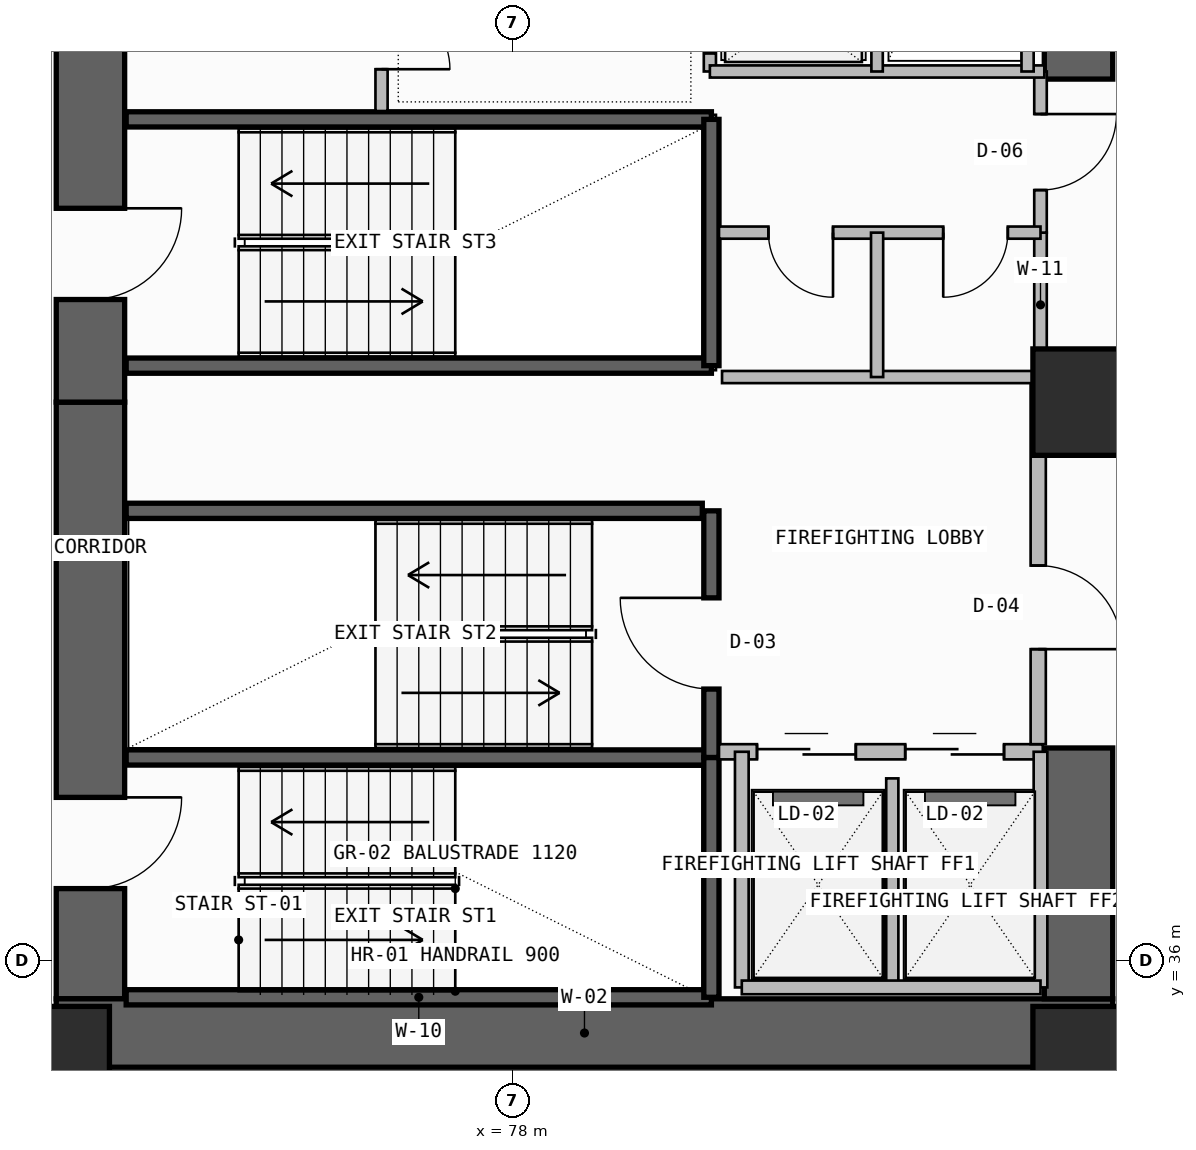
"""IFC4 building model, lengths in metres.
Left out: names, types, materials, properties, quantities, classifications, styles, units other than length and angle.
Written with IfcOpenShell. Run it as: python <this file> out.ifc"""

import sys

from ifc_helpers import new_model, si_unit, direction, frame, frame_2d, origin, origin_2d, place, context, subcontext, project, spatial, rectangle, extrude, element, fill, save


model = new_model("IFC4")
c1 = context("Model", 3, precision=1e-05, world=origin(), true_north=direction((0.0, 1.0)))
c2 = subcontext(c1, "Body", "Model", "MODEL_VIEW")
j1 = project(units=[si_unit("LENGTHUNIT", "METRE"), si_unit("PLANEANGLEUNIT", "RADIAN")], contexts=[c1])
p1 = place(None, origin())
s1 = spatial("IfcSite", under=j1, at=p1, CompositionType="ELEMENT")
p2 = place(p1, origin())
s2 = spatial("IfcBuilding", under=s1, at=p2, CompositionType="ELEMENT")
p3 = place(p2, frame((0.0, 0.0, 99.3)))
s3 = spatial("IfcBuildingStorey", under=s2, at=p3, CompositionType="ELEMENT", Elevation=99.3)
p4 = place(p3, frame((72.45, 35.5, -0.26), z_axis=(0.0, 0.0, 1.0), x_axis=(0.0, 1.0, 0.0)))
e1 = element("IfcWall", 1, at=p4, inside=s3, PredefinedType="SHEAR", context=c2, shape_type="SweptSolid", body=[
    extrude(rectangle(XDim=7.85, YDim=0.9, at=frame_2d((3.925, 0.0))), origin(), (0.0, 0.0, 1.0), 3.6),
])
p5 = place(p4, frame((1.45, 0.0, 0.26)))
e2 = element("IfcOpeningElement", 2, at=p5, cuts=e1, PredefinedType="OPENING", context=c2, shape_type="SweptSolid", body=[
    extrude(rectangle(XDim=1.2, YDim=2.2, at=frame_2d((0.6, 1.1))), frame((0.0, 0.46, 0.0), z_axis=(0.0, -1.0, 0.0), x_axis=(1.0, 0.0, 0.0)), (0.0, 0.0, 1.0), 0.92),
])
p6 = place(p3, frame((72.0, 35.05, -0.26), z_axis=(0.0, 0.0, 1.0), x_axis=(1.0, 0.0, 0.0)))
e3 = element("IfcWall", 3, at=p6, inside=s3, PredefinedType="SHEAR", context=c2, shape_type="SweptSolid", body=[
    extrude(rectangle(XDim=13.9, YDim=0.9, at=frame_2d((6.95, 0.0))), origin(), (0.0, 0.0, 1.0), 3.6),
])
p7 = place(p3, frame((85.45, 35.5, -0.26), z_axis=(0.0, 0.0, 1.0), x_axis=(0.0, 1.0, 0.0)))
e4 = element("IfcWall", 4, at=p7, inside=s3, PredefinedType="SHEAR", context=c2, shape_type="SweptSolid", body=[
    extrude(rectangle(XDim=3.3, YDim=0.9, at=frame_2d((1.65, 0.0))), origin(), (0.0, 0.0, 1.0), 3.6),
])
p8 = place(p3, frame((72.45, 43.35, -0.26), z_axis=(0.0, 0.0, 1.0), x_axis=(0.0, 1.0, 0.0)))
e5 = element("IfcWall", 5, at=p8, inside=s3, PredefinedType="SHEAR", context=c2, shape_type="SweptSolid", body=[
    extrude(rectangle(XDim=12.7, YDim=0.9, at=frame_2d((6.35, 0.0))), origin(), (0.0, 0.0, 1.0), 3.6),
])
p9 = place(p8, frame((1.35, 0.0, 0.26)))
e6 = element("IfcOpeningElement", 6, at=p9, cuts=e5, PredefinedType="OPENING", context=c2, shape_type="SweptSolid", body=[
    extrude(rectangle(XDim=1.2, YDim=2.2, at=frame_2d((0.6, 1.1))), frame((0.0, 0.46, 0.0), z_axis=(0.0, -1.0, 0.0), x_axis=(1.0, 0.0, 0.0)), (0.0, 0.0, 1.0), 0.92),
])
p10 = place(p3, frame((85.45, 47.6, -0.26), z_axis=(0.0, 0.0, 1.0), x_axis=(0.0, 1.0, 0.0)))
e7 = element("IfcWall", 7, at=p10, inside=s3, PredefinedType="SHEAR", context=c2, shape_type="SweptSolid", body=[
    extrude(rectangle(XDim=8.45, YDim=0.9, at=frame_2d((4.225, 0.0))), origin(), (0.0, 0.0, 1.0), 3.6),
])
for number, where, z_axis, x_axis in (
    (8, (72.0, 34.7, 0.0), (0.0, 0.0, 1.0), (1.0, 0.0, 0.0)),
    (9, (85.55, 34.7, 0.0), (0.0, 0.0, 1.0), (1.0, 0.0, 0.0)),
    (10, (85.55, 43.35, 0.0), (0.0, 0.0, 1.0), (1.0, 0.0, 0.0)),
):
    element("IfcColumn", number, at=place(p3, frame(where, z_axis=z_axis, x_axis=x_axis)), inside=s3, PredefinedType="COLUMN", context=c2, shape_type="SweptSolid", body=[
        extrude(rectangle(XDim=1.4, YDim=1.4, at=origin_2d()), origin(), (0.0, 0.0, 1.0), 3.6),
    ])
for number, where, z_axis, x_axis in (
    (11, (72.92, 35.52, -0.26), (0.0, 0.0, 1.0), (1.0, 0.0, 0.0)),
    (12, (72.92, 38.675, -0.26), (0.0, 0.0, 1.0), (1.0, 0.0, 0.0)),
):
    element("IfcWall", number, at=place(p3, frame(where, z_axis=z_axis, x_axis=x_axis)), inside=s3, PredefinedType="SOLIDWALL", context=c2, shape_type="SweptSolid", body=[
        extrude(rectangle(XDim=7.7, YDim=0.2, at=frame_2d((3.85, 0.0))), origin(), (0.0, 0.0, 1.0), 3.6),
    ])
p11 = place(p3, frame((80.62, 35.52, -0.26), z_axis=(0.0, 0.0, 1.0), x_axis=(0.0, 1.0, 0.0)))
e13 = element("IfcWall", 13, at=p11, inside=s3, PredefinedType="SOLIDWALL", context=c2, shape_type="SweptSolid", body=[
    extrude(rectangle(XDim=3.155, YDim=0.2, at=frame_2d((1.578, 0.0))), origin(), (0.0, 0.0, 1.0), 3.6),
])
p12 = place(p3, frame((80.62, 38.675, -0.26), z_axis=(0.0, 0.0, 1.0), x_axis=(0.0, 1.0, 0.0)))
e14 = element("IfcWall", 14, at=p12, inside=s3, PredefinedType="SOLIDWALL", context=c2, shape_type="SweptSolid", body=[
    extrude(rectangle(XDim=3.245, YDim=0.2, at=frame_2d((1.623, 0.0))), origin(), (0.0, 0.0, 1.0), 3.6),
])
p13 = place(p12, frame((0.9, 0.0, 0.26)))
e15 = element("IfcOpeningElement", 15, at=p13, cuts=e14, PredefinedType="OPENING", context=c2, shape_type="SweptSolid", body=[
    extrude(rectangle(XDim=1.2, YDim=2.2, at=frame_2d((0.6, 1.1))), frame((0.0, 0.11, 0.0), z_axis=(0.0, -1.0, 0.0), x_axis=(1.0, 0.0, 0.0)), (0.0, 0.0, 1.0), 0.22),
])
p14 = place(p3, frame((80.72, 38.75, 0.0), z_axis=(0.0, 0.0, 1.0), x_axis=(1.0, 0.0, 0.0)))
e16 = element("IfcWall", 16, at=p14, inside=s3, PredefinedType="SOLIDWALL", context=c2, shape_type="SweptSolid", body=[
    extrude(rectangle(XDim=4.26, YDim=0.2, at=frame_2d((2.13, 0.0))), origin(), (0.0, 0.0, 1.0), 3.34),
])
p15 = place(p14, frame((0.5, 0.0, 0.0)))
e17 = element("IfcOpeningElement", 17, at=p15, cuts=e16, PredefinedType="OPENING", context=c2, shape_type="SweptSolid", body=[
    extrude(rectangle(XDim=1.3, YDim=2.3, at=frame_2d((0.65, 1.15))), frame((0.0, 0.11, 0.0), z_axis=(0.0, -1.0, 0.0), x_axis=(1.0, 0.0, 0.0)), (0.0, 0.0, 1.0), 0.22),
])
p16 = place(p14, frame((2.45, 0.0, 0.0)))
e18 = element("IfcOpeningElement", 18, at=p16, cuts=e16, PredefinedType="OPENING", context=c2, shape_type="SweptSolid", body=[
    extrude(rectangle(XDim=1.3, YDim=2.3, at=frame_2d((0.65, 1.15))), frame((0.0, 0.11, 0.0), z_axis=(0.0, -1.0, 0.0), x_axis=(1.0, 0.0, 0.0)), (0.0, 0.0, 1.0), 0.22),
])
p17 = place(p3, frame((83.0, 35.65, 0.0), z_axis=(0.0, 0.0, 1.0), x_axis=(0.0, 1.0, 0.0)))
e19 = element("IfcWall", 19, at=p17, inside=s3, PredefinedType="PLUMBINGWALL", context=c2, shape_type="SweptSolid", body=[
    extrude(rectangle(XDim=2.75, YDim=0.16, at=frame_2d((1.375, 0.0))), origin(), (0.0, 0.0, 1.0), 3.34),
])
for number, where, z_axis, x_axis in (
    (20, (84.95, 35.65, 0.0), (0.0, 0.0, 1.0), (0.0, 1.0, 0.0)),
    (21, (81.02, 35.65, 0.0), (0.0, 0.0, 1.0), (0.0, 1.0, 0.0)),
):
    element("IfcWall", number, at=place(p3, frame(where, z_axis=z_axis, x_axis=x_axis)), inside=s3, PredefinedType="SOLIDWALL", context=c2, shape_type="SweptSolid", body=[
        extrude(rectangle(XDim=3.1, YDim=0.18, at=frame_2d((1.55, 0.0))), origin(), (0.0, 0.0, 1.0), 3.34),
    ])
p18 = place(p3, frame((81.02, 35.65, 0.0), z_axis=(0.0, 0.0, 1.0), x_axis=(1.0, 0.0, 0.0)))
e22 = element("IfcWall", 22, at=p18, inside=s3, PredefinedType="SOLIDWALL", context=c2, shape_type="SweptSolid", body=[
    extrude(rectangle(XDim=3.93, YDim=0.18, at=frame_2d((1.965, 0.0))), origin(), (0.0, 0.0, 1.0), 3.34),
])
p19 = place(p3, frame((84.92, 38.85, 0.0), z_axis=(0.0, 0.0, 1.0), x_axis=(0.0, 1.0, 0.0)))
e23 = element("IfcWall", 23, at=p19, inside=s3, PredefinedType="SOLIDWALL", context=c2, shape_type="SweptSolid", body=[
    extrude(rectangle(XDim=4.83, YDim=0.2, at=frame_2d((2.415, 0.0))), origin(), (0.0, 0.0, 1.0), 3.34),
])
p20 = place(p19, frame((1.25, 0.0, 0.0)))
e24 = element("IfcOpeningElement", 24, at=p20, cuts=e23, PredefinedType="OPENING", context=c2, shape_type="SweptSolid", body=[
    extrude(rectangle(XDim=1.1, YDim=2.2, at=frame_2d((0.55, 1.1))), frame((0.0, 0.11, 0.0), z_axis=(0.0, -1.0, 0.0), x_axis=(1.0, 0.0, 0.0)), (0.0, 0.0, 1.0), 0.22),
])
p21 = place(p3, frame((72.92, 41.92, -0.26), z_axis=(0.0, 0.0, 1.0), x_axis=(1.0, 0.0, 0.0)))
e25 = element("IfcWall", 25, at=p21, inside=s3, PredefinedType="SOLIDWALL", context=c2, shape_type="SweptSolid", body=[
    extrude(rectangle(XDim=7.58, YDim=0.2, at=frame_2d((3.79, 0.0))), origin(), (0.0, 0.0, 1.0), 3.6),
])
for number, where, z_axis, x_axis in (
    (26, (72.92, 43.83, -0.26), (0.0, 0.0, 1.0), (1.0, 0.0, 0.0)),
    (27, (72.92, 47.07, -0.26), (0.0, 0.0, 1.0), (1.0, 0.0, 0.0)),
):
    element("IfcWall", number, at=place(p3, frame(where, z_axis=z_axis, x_axis=x_axis)), inside=s3, PredefinedType="SOLIDWALL", context=c2, shape_type="SweptSolid", body=[
        extrude(rectangle(XDim=7.7, YDim=0.2, at=frame_2d((3.85, 0.0))), origin(), (0.0, 0.0, 1.0), 3.6),
    ])
p22 = place(p3, frame((80.62, 43.83, -0.26), z_axis=(0.0, 0.0, 1.0), x_axis=(0.0, 1.0, 0.0)))
e28 = element("IfcWall", 28, at=p22, inside=s3, PredefinedType="SOLIDWALL", context=c2, shape_type="SweptSolid", body=[
    extrude(rectangle(XDim=3.24, YDim=0.2, at=frame_2d((1.62, 0.0))), origin(), (0.0, 0.0, 1.0), 3.6),
])
p23 = place(p3, frame((84.95, 43.68, 0.0), z_axis=(0.0, 0.0, 1.0), x_axis=(0.0, 1.0, 0.0)))
e29 = element("IfcWall", 29, at=p23, inside=s3, PredefinedType="PLUMBINGWALL", context=c2, shape_type="SweptSolid", body=[
    extrude(rectangle(XDim=1.9, YDim=0.165, at=frame_2d((0.95, 0.0))), origin(), (0.0, 0.0, 1.0), 3.34),
])
p24 = place(p3, frame((84.95, 45.58, 0.0), z_axis=(0.0, 0.0, 1.0), x_axis=(0.0, 1.0, 0.0)))
e30 = element("IfcWall", 30, at=p24, inside=s3, PredefinedType="PARTITIONING", context=c2, shape_type="SweptSolid", body=[
    extrude(rectangle(XDim=2.12, YDim=0.165, at=frame_2d((1.06, 0.0))), origin(), (0.0, 0.0, 1.0), 3.34),
])
p25 = place(p24, frame((0.56, 0.0, 0.0)))
e31 = element("IfcOpeningElement", 31, at=p25, cuts=e30, PredefinedType="OPENING", context=c2, shape_type="SweptSolid", body=[
    extrude(rectangle(XDim=1.0, YDim=2.2, at=frame_2d((0.5, 1.1))), frame((0.0, 0.093, 0.0), z_axis=(0.0, -1.0, 0.0), x_axis=(1.0, 0.0, 0.0)), (0.0, 0.0, 1.0), 0.185),
])
p26 = place(p3, frame((80.72, 45.58, 0.0), z_axis=(0.0, 0.0, 1.0), x_axis=(1.0, 0.0, 0.0)))
e32 = element("IfcWall", 32, at=p26, inside=s3, PredefinedType="PLUMBINGWALL", context=c2, shape_type="SweptSolid", body=[
    extrude(rectangle(XDim=4.23, YDim=0.16, at=frame_2d((2.115, 0.0))), origin(), (0.0, 0.0, 1.0), 3.34),
])
p27 = place(p26, frame((0.65, 0.0, 0.0)))
e33 = element("IfcOpeningElement", 33, at=p27, cuts=e32, PredefinedType="OPENING", context=c2, shape_type="SweptSolid", body=[
    extrude(rectangle(XDim=0.85, YDim=2.05, at=frame_2d((0.425, 1.025))), frame((0.0, 0.09, 0.0), z_axis=(0.0, -1.0, 0.0), x_axis=(1.0, 0.0, 0.0)), (0.0, 0.0, 1.0), 0.18),
])
p28 = place(p26, frame((2.95, 0.0, 0.0)))
e34 = element("IfcOpeningElement", 34, at=p28, cuts=e32, PredefinedType="OPENING", context=c2, shape_type="SweptSolid", body=[
    extrude(rectangle(XDim=0.85, YDim=2.05, at=frame_2d((0.425, 1.025))), frame((0.0, 0.09, 0.0), z_axis=(0.0, -1.0, 0.0), x_axis=(1.0, 0.0, 0.0)), (0.0, 0.0, 1.0), 0.18),
])
p29 = place(p3, frame((80.76, 43.68, 0.0), z_axis=(0.0, 0.0, 1.0), x_axis=(1.0, 0.0, 0.0)))
e35 = element("IfcWall", 35, at=p29, inside=s3, PredefinedType="PLUMBINGWALL", context=c2, shape_type="SweptSolid", body=[
    extrude(rectangle(XDim=4.19, YDim=0.16, at=frame_2d((2.095, 0.0))), origin(), (0.0, 0.0, 1.0), 3.34),
])
p30 = place(p3, frame((82.8, 43.68, 0.0), z_axis=(0.0, 0.0, 1.0), x_axis=(0.0, 1.0, 0.0)))
e36 = element("IfcWall", 36, at=p30, inside=s3, PredefinedType="PLUMBINGWALL", context=c2, shape_type="SweptSolid", body=[
    extrude(rectangle(XDim=1.9, YDim=0.16, at=frame_2d((0.95, 0.0))), origin(), (0.0, 0.0, 1.0), 3.34),
])
p31 = place(p3, frame((76.28, 47.18, 0.0), z_axis=(0.0, 0.0, 1.0), x_axis=(0.0, 1.0, 0.0)))
e37 = element("IfcWall", 37, at=p31, inside=s3, PredefinedType="SOLIDWALL", context=c2, shape_type="SweptSolid", body=[
    extrude(rectangle(XDim=5.14, YDim=0.16, at=frame_2d((2.57, 0.0))), origin(), (0.0, 0.0, 1.0), 3.34),
])
p32 = place(p31, frame((0.55, 0.0, 0.0)))
e38 = element("IfcOpeningElement", 38, at=p32, cuts=e37, PredefinedType="OPENING", context=c2, shape_type="SweptSolid", body=[
    extrude(rectangle(XDim=0.9, YDim=2.1, at=frame_2d((0.45, 1.05))), frame((0.0, 0.09, 0.0), z_axis=(0.0, -1.0, 0.0), x_axis=(1.0, 0.0, 0.0)), (0.0, 0.0, 1.0), 0.18),
])
p33 = place(p31, frame((2.95, 0.0, 0.0)))
e39 = element("IfcOpeningElement", 39, at=p33, cuts=e37, PredefinedType="OPENING", context=c2, shape_type="SweptSolid", body=[
    extrude(rectangle(XDim=1.0, YDim=2.2, at=frame_2d((0.5, 1.1))), frame((0.0, 0.09, 0.0), z_axis=(0.0, -1.0, 0.0), x_axis=(1.0, 0.0, 0.0)), (0.0, 0.0, 1.0), 0.18),
])
p34 = place(p3, frame((80.6, 47.7, 0.0), z_axis=(0.0, 0.0, 1.0), x_axis=(0.0, 1.0, 0.0)))
e40 = element("IfcWall", 40, at=p34, inside=s3, PredefinedType="SOLIDWALL", context=c2, shape_type="SweptSolid", body=[
    extrude(rectangle(XDim=4.6, YDim=0.16, at=frame_2d((2.3, 0.0))), origin(), (0.0, 0.0, 1.0), 3.34),
])
p35 = place(p34, frame((0.24, 0.0, 0.0)))
e41 = element("IfcOpeningElement", 41, at=p35, cuts=e40, PredefinedType="OPENING", context=c2, shape_type="SweptSolid", body=[
    extrude(rectangle(XDim=1.1, YDim=2.25, at=frame_2d((0.55, 1.125))), frame((0.0, 0.09, 0.0), z_axis=(0.0, -1.0, 0.0), x_axis=(1.0, 0.0, 0.0)), (0.0, 0.0, 1.0), 0.18),
])
p36 = place(p34, frame((1.76, 0.0, 0.0)))
e42 = element("IfcOpeningElement", 42, at=p36, cuts=e40, PredefinedType="OPENING", context=c2, shape_type="SweptSolid", body=[
    extrude(rectangle(XDim=1.1, YDim=2.25, at=frame_2d((0.55, 1.125))), frame((0.0, 0.09, 0.0), z_axis=(0.0, -1.0, 0.0), x_axis=(1.0, 0.0, 0.0)), (0.0, 0.0, 1.0), 0.18),
])
p37 = place(p34, frame((3.28, 0.0, 0.0)))
e43 = element("IfcOpeningElement", 43, at=p37, cuts=e40, PredefinedType="OPENING", context=c2, shape_type="SweptSolid", body=[
    extrude(rectangle(XDim=1.1, YDim=2.25, at=frame_2d((0.55, 1.125))), frame((0.0, 0.09, 0.0), z_axis=(0.0, -1.0, 0.0), x_axis=(1.0, 0.0, 0.0)), (0.0, 0.0, 1.0), 0.18),
])
p38 = place(p3, frame((80.6, 47.7, 0.0), z_axis=(0.0, 0.0, 1.0), x_axis=(1.0, 0.0, 0.0)))
e44 = element("IfcWall", 44, at=p38, inside=s3, PredefinedType="SOLIDWALL", context=c2, shape_type="SweptSolid", body=[
    extrude(rectangle(XDim=4.4, YDim=0.16, at=frame_2d((2.2, 0.0))), origin(), (0.0, 0.0, 1.0), 3.34),
])
p39 = place(p3, frame((82.8, 47.7, 0.0), z_axis=(0.0, 0.0, 1.0), x_axis=(0.0, 1.0, 0.0)))
e45 = element("IfcWall", 45, at=p39, inside=s3, PredefinedType="PLUMBINGWALL", context=c2, shape_type="SweptSolid", body=[
    extrude(rectangle(XDim=4.6, YDim=0.15, at=frame_2d((2.3, 0.0))), origin(), (0.0, 0.0, 1.0), 3.34),
])
p40 = place(p3, frame((84.78, 47.7, 0.0), z_axis=(0.0, 0.0, 1.0), x_axis=(0.0, 1.0, 0.0)))
e46 = element("IfcWall", 46, at=p40, inside=s3, PredefinedType="SOLIDWALL", context=c2, shape_type="SweptSolid", body=[
    extrude(rectangle(XDim=4.6, YDim=0.16, at=frame_2d((2.3, 0.0))), origin(), (0.0, 0.0, 1.0), 3.34),
])
p41 = place(p5, frame((1.2, 0.0, 0.0), z_axis=(0.0, 0.0, 1.0), x_axis=(-1.0, 0.0, 0.0)))
e47 = element("IfcDoor", 47, at=p41, inside=s3, OperationType="SINGLE_SWING_LEFT", PredefinedType="USERDEFINED", context=c2, shape_type="SweptSolid", body=[
    extrude(rectangle(XDim=1.2, YDim=2.2, at=frame_2d((0.6, 1.1))), frame((0.0, 0.025, 0.0), z_axis=(0.0, -1.0, 0.0), x_axis=(1.0, 0.0, 0.0)), (0.0, 0.0, 1.0), 0.05),
])
fill(e2, e47)
p42 = place(p13, origin())
e48 = element("IfcDoor", 48, at=p42, inside=s3, OperationType="SINGLE_SWING_RIGHT", PredefinedType="USERDEFINED", context=c2, shape_type="SweptSolid", body=[
    extrude(rectangle(XDim=1.2, YDim=2.2, at=frame_2d((0.6, 1.1))), frame((0.0, 0.025, 0.0), z_axis=(0.0, -1.0, 0.0), x_axis=(1.0, 0.0, 0.0)), (0.0, 0.0, 1.0), 0.05),
])
fill(e15, e48)
p43 = place(p15, origin())
e49 = element("IfcDoor", 49, at=p43, inside=s3, OperationType="DOUBLE_DOOR_SLIDING", PredefinedType="DOOR", context=c2, shape_type="SweptSolid", body=[
    extrude(rectangle(XDim=1.3, YDim=2.3, at=frame_2d((0.65, 1.15))), frame((0.0, 0.025, 0.0), z_axis=(0.0, -1.0, 0.0), x_axis=(1.0, 0.0, 0.0)), (0.0, 0.0, 1.0), 0.05),
])
fill(e17, e49)
p44 = place(p16, origin())
e50 = element("IfcDoor", 50, at=p44, inside=s3, OperationType="DOUBLE_DOOR_SLIDING", PredefinedType="DOOR", context=c2, shape_type="SweptSolid", body=[
    extrude(rectangle(XDim=1.3, YDim=2.3, at=frame_2d((0.65, 1.15))), frame((0.0, 0.025, 0.0), z_axis=(0.0, -1.0, 0.0), x_axis=(1.0, 0.0, 0.0)), (0.0, 0.0, 1.0), 0.05),
])
fill(e18, e50)
p45 = place(p20, frame((1.1, 0.0, 0.0), z_axis=(0.0, 0.0, 1.0), x_axis=(-1.0, 0.0, 0.0)))
e51 = element("IfcDoor", 51, at=p45, inside=s3, OperationType="SINGLE_SWING_RIGHT", PredefinedType="DOOR", context=c2, shape_type="SweptSolid", body=[
    extrude(rectangle(XDim=1.1, YDim=2.2, at=frame_2d((0.55, 1.1))), frame((0.0, 0.025, 0.0), z_axis=(0.0, -1.0, 0.0), x_axis=(1.0, 0.0, 0.0)), (0.0, 0.0, 1.0), 0.05),
])
fill(e24, e51)
p46 = place(p9, frame((1.2, 0.0, 0.0), z_axis=(0.0, 0.0, 1.0), x_axis=(-1.0, 0.0, 0.0)))
e52 = element("IfcDoor", 52, at=p46, inside=s3, OperationType="SINGLE_SWING_LEFT", PredefinedType="USERDEFINED", context=c2, shape_type="SweptSolid", body=[
    extrude(rectangle(XDim=1.2, YDim=2.2, at=frame_2d((0.6, 1.1))), frame((0.0, 0.025, 0.0), z_axis=(0.0, -1.0, 0.0), x_axis=(1.0, 0.0, 0.0)), (0.0, 0.0, 1.0), 0.05),
])
fill(e6, e52)
p47 = place(p25, frame((1.0, 0.0, 0.0), z_axis=(0.0, 0.0, 1.0), x_axis=(-1.0, 0.0, 0.0)))
e53 = element("IfcDoor", 53, at=p47, inside=s3, OperationType="SINGLE_SWING_LEFT", PredefinedType="DOOR", context=c2, shape_type="SweptSolid", body=[
    extrude(rectangle(XDim=1.0, YDim=2.2, at=frame_2d((0.5, 1.1))), frame((0.0, 0.025, 0.0), z_axis=(0.0, -1.0, 0.0), x_axis=(1.0, 0.0, 0.0)), (0.0, 0.0, 1.0), 0.05),
])
fill(e31, e53)
p48 = place(p27, frame((0.85, 0.0, 0.0), z_axis=(0.0, 0.0, 1.0), x_axis=(-1.0, 0.0, 0.0)))
e54 = element("IfcDoor", 54, at=p48, inside=s3, OperationType="SINGLE_SWING_LEFT", PredefinedType="DOOR", context=c2, shape_type="SweptSolid", body=[
    extrude(rectangle(XDim=0.85, YDim=2.05, at=frame_2d((0.425, 1.025))), frame((0.0, 0.025, 0.0), z_axis=(0.0, -1.0, 0.0), x_axis=(1.0, 0.0, 0.0)), (0.0, 0.0, 1.0), 0.05),
])
fill(e33, e54)
p49 = place(p28, frame((0.85, 0.0, 0.0), z_axis=(0.0, 0.0, 1.0), x_axis=(-1.0, 0.0, 0.0)))
e55 = element("IfcDoor", 55, at=p49, inside=s3, OperationType="SINGLE_SWING_RIGHT", PredefinedType="DOOR", context=c2, shape_type="SweptSolid", body=[
    extrude(rectangle(XDim=0.85, YDim=2.05, at=frame_2d((0.425, 1.025))), frame((0.0, 0.025, 0.0), z_axis=(0.0, -1.0, 0.0), x_axis=(1.0, 0.0, 0.0)), (0.0, 0.0, 1.0), 0.05),
])
fill(e34, e55)
p50 = place(p32, frame((0.9, 0.0, 0.0), z_axis=(0.0, 0.0, 1.0), x_axis=(-1.0, 0.0, 0.0)))
e56 = element("IfcDoor", 56, at=p50, inside=s3, OperationType="SINGLE_SWING_RIGHT", PredefinedType="DOOR", context=c2, shape_type="SweptSolid", body=[
    extrude(rectangle(XDim=0.9, YDim=2.1, at=frame_2d((0.45, 1.05))), frame((0.0, 0.025, 0.0), z_axis=(0.0, -1.0, 0.0), x_axis=(1.0, 0.0, 0.0)), (0.0, 0.0, 1.0), 0.05),
])
fill(e38, e56)
p51 = place(p35, frame((1.1, 0.0, 0.0), z_axis=(0.0, 0.0, 1.0), x_axis=(-1.0, 0.0, 0.0)))
e57 = element("IfcDoor", 57, at=p51, inside=s3, OperationType="DOUBLE_DOOR_SLIDING", PredefinedType="DOOR", context=c2, shape_type="SweptSolid", body=[
    extrude(rectangle(XDim=1.1, YDim=2.25, at=frame_2d((0.55, 1.125))), frame((0.0, 0.025, 0.0), z_axis=(0.0, -1.0, 0.0), x_axis=(1.0, 0.0, 0.0)), (0.0, 0.0, 1.0), 0.05),
])
fill(e41, e57)
save(model, sys.argv[1])
